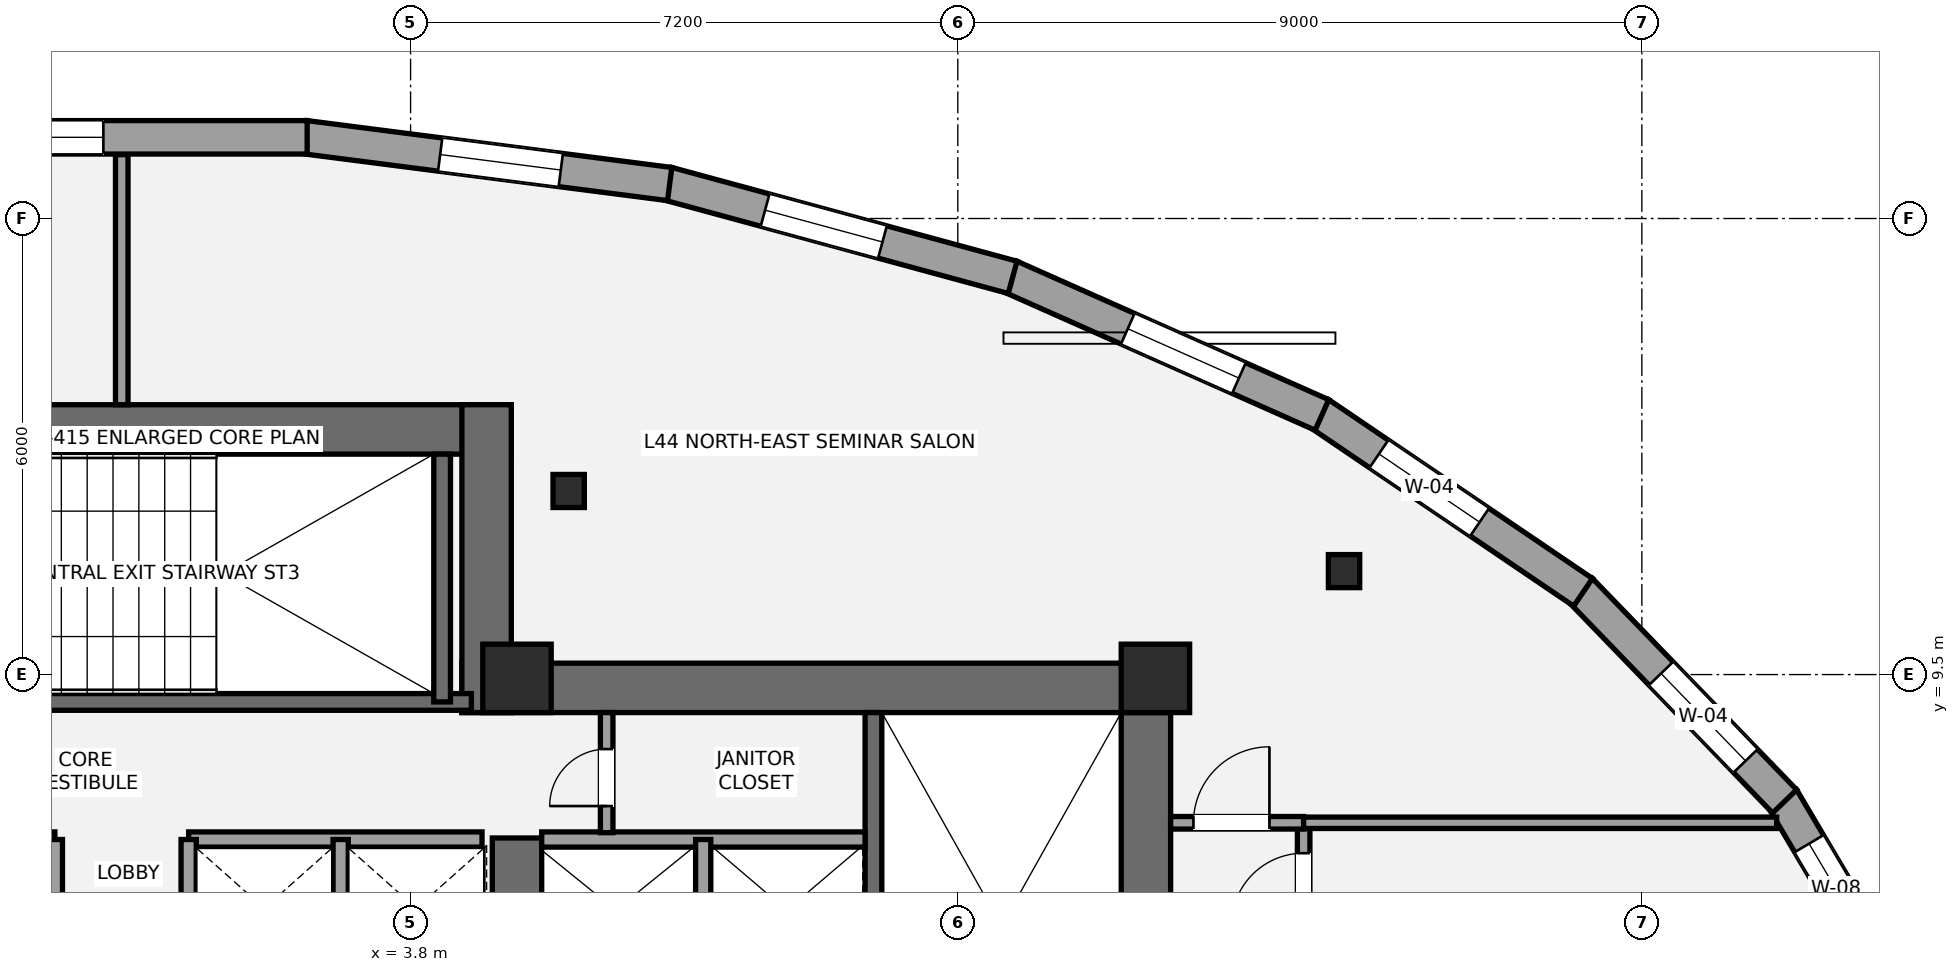
"""IFC4 building model, lengths in metres.
Left out: names, types, materials, properties, quantities, classifications, styles, units other than length and angle.
Written with IfcOpenShell. Run it as: python <this file> out.ifc"""

import sys

from ifc_helpers import new_model, si_unit, direction, frame, frame_2d, origin, origin_2d, place, context, subcontext, project, spatial, rectangle, i_section, extrude, element, fill, save


model = new_model("IFC4")
c1 = context("Model", 3, precision=1e-05, world=origin(), true_north=direction((0.0, 1.0)))
c2 = subcontext(c1, "Body", "Model", "MODEL_VIEW")
j1 = project(units=[si_unit("LENGTHUNIT", "METRE"), si_unit("PLANEANGLEUNIT", "RADIAN")], contexts=[c1])
p1 = place(None, origin())
s1 = spatial("IfcSite", under=j1, at=p1, CompositionType="ELEMENT")
p2 = place(p1, origin())
s2 = spatial("IfcBuilding", under=s1, at=p2, CompositionType="ELEMENT")
p3 = place(p2, frame((0.0, 0.0, 163.0)))
s3 = spatial("IfcBuildingStorey", under=s2, at=p3, CompositionType="ELEMENT", Elevation=163.0)
p4 = place(p3, frame((13.475, 1.2, 0.0), z_axis=(0.0, 0.0, 1.0), x_axis=(0.0, 1.0, 0.0)))
e1 = element("IfcWall", 1, at=p4, inside=s3, PredefinedType="SHEAR", context=c2, shape_type="SweptSolid", body=[
    extrude(rectangle(XDim=8.45, YDim=0.65, at=frame_2d((4.225, 0.0))), origin(), (0.0, 0.0, 1.0), 3.2),
])
p5 = place(p3, frame((4.475, 9.325, 0.0), z_axis=(0.0, 0.0, 1.0), x_axis=(1.0, 0.0, 0.0)))
e2 = element("IfcWall", 2, at=p5, inside=s3, PredefinedType="SHEAR", context=c2, shape_type="SweptSolid", body=[
    extrude(rectangle(XDim=9.325, YDim=0.65, at=frame_2d((4.663, 0.0))), origin(), (0.0, 0.0, 1.0), 3.2),
])
p6 = place(p3, frame((5.2, 5.35, 0.0), z_axis=(0.0, 0.0, 1.0), x_axis=(0.0, 1.0, 0.0)))
e3 = element("IfcWall", 3, at=p6, inside=s3, PredefinedType="SHEAR", context=c2, shape_type="SweptSolid", body=[
    extrude(rectangle(XDim=2.0, YDim=0.65, at=frame_2d((1.0, 0.0))), origin(), (0.0, 0.0, 1.0), 3.2),
])
p7 = place(p3, frame((9.89, 1.85, 0.0), z_axis=(0.0, 0.0, 1.0), x_axis=(0.0, 1.0, 0.0)))
e4 = element("IfcWall", 4, at=p7, inside=s3, PredefinedType="SHEAR", context=c2, shape_type="SweptSolid", body=[
    extrude(rectangle(XDim=7.15, YDim=0.22, at=frame_2d((3.575, 0.0))), origin(), (0.0, 0.0, 1.0), 3.2),
])
p8 = place(p3, frame((-5.125, 12.725, 0.0), z_axis=(0.0, 0.0, 1.0), x_axis=(1.0, 0.0, 0.0)))
e5 = element("IfcWall", 5, at=p8, inside=s3, PredefinedType="SHEAR", context=c2, shape_type="SweptSolid", body=[
    extrude(rectangle(XDim=10.25, YDim=0.65, at=frame_2d((5.125, 0.0))), origin(), (0.0, 0.0, 1.0), 3.2),
])
p9 = place(p3, frame((4.8, 9.0, 0.0), z_axis=(0.0, 0.0, 1.0), x_axis=(0.0, 1.0, 0.0)))
e6 = element("IfcWall", 6, at=p9, inside=s3, PredefinedType="SHEAR", context=c2, shape_type="SweptSolid", body=[
    extrude(rectangle(XDim=4.05, YDim=0.65, at=frame_2d((2.025, 0.0))), origin(), (0.0, 0.0, 1.0), 3.2),
])
p10 = place(p3, frame((-4.7, 9.14, 0.0), z_axis=(0.0, 0.0, 1.0), x_axis=(1.0, 0.0, 0.0)))
e7 = element("IfcWall", 7, at=p10, inside=s3, PredefinedType="SHEAR", context=c2, shape_type="SweptSolid", body=[
    extrude(rectangle(XDim=9.3, YDim=0.22, at=frame_2d((4.65, 0.0))), origin(), (0.0, 0.0, 1.0), 3.2),
])
p11 = place(p10, frame((1.15, 0.0, 0.0)))
e8 = element("IfcOpeningElement", 8, at=p11, cuts=e7, PredefinedType="OPENING", context=c2, shape_type="SweptSolid", body=[
    extrude(rectangle(XDim=1.05, YDim=2.15, at=frame_2d((0.525, 1.075))), frame((0.0, 0.12, 0.0), z_axis=(0.0, -1.0, 0.0), x_axis=(1.0, 0.0, 0.0)), (0.0, 0.0, 1.0), 0.24),
])
p12 = place(p3, frame((4.215, 9.14, 0.0), z_axis=(0.0, 0.0, 1.0), x_axis=(0.0, 1.0, 0.0)))
e9 = element("IfcWall", 9, at=p12, inside=s3, PredefinedType="SHEAR", context=c2, shape_type="SweptSolid", body=[
    extrude(rectangle(XDim=3.26, YDim=0.22, at=frame_2d((1.63, 0.0))), origin(), (0.0, 0.0, 1.0), 3.2),
])
for number, where, z_axis, x_axis in (
    (10, (5.2, 9.45, 0.0), (0.0, 0.0, 1.0), (1.0, 0.0, 0.0)),
    (11, (13.6, 9.45, 0.0), (0.0, 0.0, 1.0), (1.0, 0.0, 0.0)),
):
    element("IfcColumn", number, at=place(p3, frame(where, z_axis=z_axis, x_axis=x_axis)), inside=s3, PredefinedType="COLUMN", context=c2, shape_type="SweptSolid", body=[
        extrude(rectangle(XDim=0.9, YDim=0.9, at=origin_2d()), origin(), (0.0, 0.0, 1.0), 3.2),
    ])
for number, where, z_axis, x_axis in (
    (12, (16.082, 10.861, 0.0), (0.0, 0.0, 1.0), (1.0, 0.0, 0.0)),
    (13, (5.88, 11.915, 0.0), (0.0, 0.0, 1.0), (1.0, 0.0, 0.0)),
):
    element("IfcColumn", number, at=place(p3, frame(where, z_axis=z_axis, x_axis=x_axis)), inside=s3, PredefinedType="COLUMN", context=c2, shape_type="SweptSolid", body=[
        extrude(i_section(OverallWidth=0.412, OverallDepth=0.435, WebThickness=0.036, FlangeThickness=0.057, at=origin_2d()), origin(), (0.0, 0.0, 1.0), 3.2),
    ])
p13 = place(p3, frame((21.847, 7.873, 0.0), z_axis=(0.0, 0.0, 1.0), x_axis=(0.508883387051, -0.860835465338, 0.0)))
e14 = element("IfcWall", 14, at=p13, inside=s3, PredefinedType="STANDARD", context=c2, shape_type="SweptSolid", body=[
    extrude(rectangle(XDim=3.577, YDim=0.44, at=frame_2d((1.788, 0.0))), origin(), (0.0, 0.0, 1.0), 2.315),
])
p14 = place(p13, frame((0.694, 0.0, 0.58)))
e15 = element("IfcOpeningElement", 15, at=p14, cuts=e14, PredefinedType="OPENING", context=c2, shape_type="SweptSolid", body=[
    extrude(rectangle(XDim=1.4, YDim=1.55, at=frame_2d((0.7, 0.775))), frame((0.0, 0.23, 0.0), z_axis=(0.0, -1.0, 0.0), x_axis=(1.0, 0.0, 0.0)), (0.0, 0.0, 1.0), 0.46),
])
p15 = place(p3, frame((19.192, 10.612, 0.0), z_axis=(0.0, 0.0, 1.0), x_axis=(0.694975307772, -0.719033602544, 0.0)))
e16 = element("IfcWall", 16, at=p15, inside=s3, PredefinedType="STANDARD", context=c2, shape_type="SweptSolid", body=[
    extrude(rectangle(XDim=3.866, YDim=0.44, at=frame_2d((1.933, 0.0))), origin(), (0.0, 0.0, 1.0), 2.315),
])
p16 = place(p15, frame((1.526, 0.0, 0.58)))
e17 = element("IfcOpeningElement", 17, at=p16, cuts=e16, PredefinedType="OPENING", context=c2, shape_type="SweptSolid", body=[
    extrude(rectangle(XDim=1.6, YDim=1.55, at=frame_2d((0.8, 0.775))), frame((0.0, 0.23, 0.0), z_axis=(0.0, -1.0, 0.0), x_axis=(1.0, 0.0, 0.0)), (0.0, 0.0, 1.0), 0.46),
])
p17 = place(p3, frame((15.757, 12.935, 0.0), z_axis=(0.0, 0.0, 1.0), x_axis=(0.827760762475, -0.561081206338, 0.0)))
e18 = element("IfcWall", 18, at=p17, inside=s3, PredefinedType="STANDARD", context=c2, shape_type="SweptSolid", body=[
    extrude(rectangle(XDim=4.192, YDim=0.44, at=frame_2d((2.096, 0.0))), origin(), (0.0, 0.0, 1.0), 2.315),
])
p18 = place(p17, frame((0.947, 0.0, 0.58)))
e19 = element("IfcOpeningElement", 19, at=p18, cuts=e18, PredefinedType="OPENING", context=c2, shape_type="SweptSolid", body=[
    extrude(rectangle(XDim=1.6, YDim=1.55, at=frame_2d((0.8, 0.775))), frame((0.0, 0.23, 0.0), z_axis=(0.0, -1.0, 0.0), x_axis=(1.0, 0.0, 0.0)), (0.0, 0.0, 1.0), 0.46),
])
p19 = place(p3, frame((11.69, 14.737, 0.0), z_axis=(0.0, 0.0, 1.0), x_axis=(0.913907994914, -0.405921392431, 0.0)))
e20 = element("IfcWall", 20, at=p19, inside=s3, PredefinedType="STANDARD", context=c2, shape_type="SweptSolid", body=[
    extrude(rectangle(XDim=4.487, YDim=0.44, at=frame_2d((2.244, 0.0))), origin(), (0.0, 0.0, 1.0), 2.315),
])
p20 = place(p19, frame((1.692, 0.0, 0.58)))
e21 = element("IfcOpeningElement", 21, at=p20, cuts=e20, PredefinedType="OPENING", context=c2, shape_type="SweptSolid", body=[
    extrude(rectangle(XDim=1.6, YDim=1.55, at=frame_2d((0.8, 0.775))), frame((0.0, 0.23, 0.0), z_axis=(0.0, -1.0, 0.0), x_axis=(1.0, 0.0, 0.0)), (0.0, 0.0, 1.0), 0.46),
])
p21 = place(p3, frame((7.179, 15.959, 0.0), z_axis=(0.0, 0.0, 1.0), x_axis=(0.965037424263, -0.262112132058, 0.0)))
e22 = element("IfcWall", 22, at=p21, inside=s3, PredefinedType="STANDARD", context=c2, shape_type="SweptSolid", body=[
    extrude(rectangle(XDim=4.707, YDim=0.44, at=frame_2d((2.353, 0.0))), origin(), (0.0, 0.0, 1.0), 2.315),
])
p22 = place(p21, frame((1.332, 0.0, 0.58)))
e23 = element("IfcOpeningElement", 23, at=p22, cuts=e22, PredefinedType="OPENING", context=c2, shape_type="SweptSolid", body=[
    extrude(rectangle(XDim=1.6, YDim=1.55, at=frame_2d((0.8, 0.775))), frame((0.0, 0.23, 0.0), z_axis=(0.0, -1.0, 0.0), x_axis=(1.0, 0.0, 0.0)), (0.0, 0.0, 1.0), 0.46),
])
p23 = place(p3, frame((2.411, 16.57, 0.0), z_axis=(0.0, 0.0, 1.0), x_axis=(0.991852910824, -0.127388395426, 0.0)))
e24 = element("IfcWall", 24, at=p23, inside=s3, PredefinedType="STANDARD", context=c2, shape_type="SweptSolid", body=[
    extrude(rectangle(XDim=4.837, YDim=0.44, at=frame_2d((2.418, 0.0))), origin(), (0.0, 0.0, 1.0), 2.315),
])
p24 = place(p23, frame((1.793, 0.0, 0.58)))
e25 = element("IfcOpeningElement", 25, at=p24, cuts=e24, PredefinedType="OPENING", context=c2, shape_type="SweptSolid", body=[
    extrude(rectangle(XDim=1.6, YDim=1.55, at=frame_2d((0.8, 0.775))), frame((0.0, 0.23, 0.0), z_axis=(0.0, -1.0, 0.0), x_axis=(1.0, 0.0, 0.0)), (0.0, 0.0, 1.0), 0.46),
])
p25 = place(p3, frame((-2.439, 16.568, 0.0), z_axis=(0.0, 0.0, 1.0), x_axis=(1.0, 0.0, 0.0)))
e26 = element("IfcWall", 26, at=p25, inside=s3, PredefinedType="STANDARD", context=c2, shape_type="SweptSolid", body=[
    extrude(rectangle(XDim=4.878, YDim=0.44, at=frame_2d((2.439, 0.0))), origin(), (0.0, 0.0, 1.0), 2.315),
])
p26 = place(p25, frame((0.597, 0.0, 0.58)))
e27 = element("IfcOpeningElement", 27, at=p26, cuts=e26, PredefinedType="OPENING", context=c2, shape_type="SweptSolid", body=[
    extrude(rectangle(XDim=1.6, YDim=1.55, at=frame_2d((0.8, 0.775))), frame((0.0, 0.23, 0.0), z_axis=(0.0, -1.0, 0.0), x_axis=(1.0, 0.0, 0.0)), (0.0, 0.0, 1.0), 0.46),
])
p27 = place(p3, frame((5.525, 7.33, 0.0), z_axis=(0.0, 0.0, 1.0), x_axis=(1.0, 0.0, 0.0)))
e28 = element("IfcWall", 28, at=p27, inside=s3, PredefinedType="SOLIDWALL", context=c2, shape_type="SweptSolid", body=[
    extrude(rectangle(XDim=4.255, YDim=0.2, at=frame_2d((2.127, 0.0))), origin(), (0.0, 0.0, 1.0), 3.02),
])
p28 = place(p3, frame((7.65, 5.47, 0.0), z_axis=(0.0, 0.0, 1.0), x_axis=(0.0, 1.0, 0.0)))
e29 = element("IfcWall", 29, at=p28, inside=s3, PredefinedType="SOLIDWALL", context=c2, shape_type="SweptSolid", body=[
    extrude(rectangle(XDim=1.86, YDim=0.2, at=frame_2d((0.93, 0.0))), origin(), (0.0, 0.0, 1.0), 3.02),
])
for number, where, z_axis, x_axis in (
    (30, (-4.74, 7.33, 0.0), (0.0, 0.0, 1.0), (1.0, 0.0, 0.0)),
    (31, (0.88, 7.33, 0.0), (0.0, 0.0, 1.0), (1.0, 0.0, 0.0)),
):
    element("IfcWall", number, at=place(p3, frame(where, z_axis=z_axis, x_axis=x_axis)), inside=s3, PredefinedType="SOLIDWALL", context=c2, shape_type="SweptSolid", body=[
        extrude(rectangle(XDim=3.86, YDim=0.2, at=frame_2d((1.93, 0.0))), origin(), (0.0, 0.0, 1.0), 3.02),
    ])
for number, where, z_axis, x_axis in (
    (32, (2.88, 5.52, 0.0), (0.0, 0.0, 1.0), (0.0, 1.0, 0.0)),
    (33, (-0.88, 5.52, 0.0), (0.0, 0.0, 1.0), (0.0, 1.0, 0.0)),
    (34, (0.88, 5.52, 0.0), (0.0, 0.0, 1.0), (0.0, 1.0, 0.0)),
):
    element("IfcWall", number, at=place(p3, frame(where, z_axis=z_axis, x_axis=x_axis)), inside=s3, PredefinedType="SOLIDWALL", context=c2, shape_type="SweptSolid", body=[
        extrude(rectangle(XDim=1.81, YDim=0.2, at=frame_2d((0.905, 0.0))), origin(), (0.0, 0.0, 1.0), 3.02),
    ])
p29 = place(p3, frame((6.38, 7.42, 0.0), z_axis=(0.0, 0.0, 1.0), x_axis=(0.0, 1.0, 0.0)))
e35 = element("IfcWall", 35, at=p29, inside=s3, PredefinedType="PARTITIONING", context=c2, shape_type="SweptSolid", body=[
    extrude(rectangle(XDim=1.58, YDim=0.165, at=frame_2d((0.79, 0.0))), origin(), (0.0, 0.0, 1.0), 3.02),
])
p30 = place(p29, frame((0.35, 0.0, 0.0)))
e36 = element("IfcOpeningElement", 36, at=p30, cuts=e35, PredefinedType="OPENING", context=c2, shape_type="SweptSolid", body=[
    extrude(rectangle(XDim=0.75, YDim=2.1, at=frame_2d((0.375, 1.05))), frame((0.0, 0.093, 0.0), z_axis=(0.0, -1.0, 0.0), x_axis=(1.0, 0.0, 0.0)), (0.0, 0.0, 1.0), 0.185),
])
p31 = place(p3, frame((15.55, -12.773, 0.0), z_axis=(0.0, 0.0, 1.0), x_axis=(0.0, 1.0, 0.0)))
e37 = element("IfcWall", 37, at=p31, inside=s3, PredefinedType="PARTITIONING", context=c2, shape_type="SweptSolid", body=[
    extrude(rectangle(XDim=20.323, YDim=0.165, at=frame_2d((10.162, 0.0))), origin(), (0.0, 0.0, 1.0), 2.473),
])
p32 = place(p31, frame((5.773, 0.0, 0.0)))
e38 = element("IfcOpeningElement", 38, at=p32, cuts=e37, PredefinedType="OPENING", context=c2, shape_type="SweptSolid", body=[
    extrude(rectangle(XDim=0.85, YDim=2.1, at=frame_2d((0.425, 1.05))), frame((0.0, 0.093, 0.0), z_axis=(0.0, -1.0, 0.0), x_axis=(1.0, 0.0, 0.0)), (0.0, 0.0, 1.0), 0.185),
])
p33 = place(p31, frame((9.823, 0.0, 0.0)))
e39 = element("IfcOpeningElement", 39, at=p33, cuts=e37, PredefinedType="OPENING", context=c2, shape_type="SweptSolid", body=[
    extrude(rectangle(XDim=0.95, YDim=2.15, at=frame_2d((0.475, 1.075))), frame((0.0, 0.093, 0.0), z_axis=(0.0, -1.0, 0.0), x_axis=(1.0, 0.0, 0.0)), (0.0, 0.0, 1.0), 0.185),
])
p34 = place(p31, frame((14.223, 0.0, 0.0)))
e40 = element("IfcOpeningElement", 40, at=p34, cuts=e37, PredefinedType="OPENING", context=c2, shape_type="SweptSolid", body=[
    extrude(rectangle(XDim=0.95, YDim=2.15, at=frame_2d((0.475, 1.075))), frame((0.0, 0.093, 0.0), z_axis=(0.0, -1.0, 0.0), x_axis=(1.0, 0.0, 0.0)), (0.0, 0.0, 1.0), 0.185),
])
p35 = place(p31, frame((18.973, 0.0, 0.0)))
e41 = element("IfcOpeningElement", 41, at=p35, cuts=e37, PredefinedType="OPENING", context=c2, shape_type="SweptSolid", body=[
    extrude(rectangle(XDim=0.95, YDim=2.15, at=frame_2d((0.475, 1.075))), frame((0.0, 0.093, 0.0), z_axis=(0.0, -1.0, 0.0), x_axis=(1.0, 0.0, 0.0)), (0.0, 0.0, 1.0), 0.185),
])
p36 = place(p3, frame((13.8, 7.55, 0.0), z_axis=(0.0, 0.0, 1.0), x_axis=(1.0, 0.0, 0.0)))
e42 = element("IfcWall", 42, at=p36, inside=s3, PredefinedType="PARTITIONING", context=c2, shape_type="SweptSolid", body=[
    extrude(rectangle(XDim=1.75, YDim=0.165, at=frame_2d((0.875, 0.0))), origin(), (0.0, 0.0, 1.0), 2.473),
])
p37 = place(p36, frame((0.3, 0.0, 0.0)))
e43 = element("IfcOpeningElement", 43, at=p37, cuts=e42, PredefinedType="OPENING", context=c2, shape_type="SweptSolid", body=[
    extrude(rectangle(XDim=1.0, YDim=2.15, at=frame_2d((0.5, 1.075))), frame((0.0, 0.093, 0.0), z_axis=(0.0, -1.0, 0.0), x_axis=(1.0, 0.0, 0.0)), (0.0, 0.0, 1.0), 0.185),
])
p38 = place(p3, frame((15.55, 7.55, 0.0), z_axis=(0.0, 0.0, 1.0), x_axis=(1.0, 0.0, 0.0)))
e44 = element("IfcWall", 44, at=p38, inside=s3, PredefinedType="PLUMBINGWALL", context=c2, shape_type="SweptSolid", body=[
    extrude(rectangle(XDim=6.223, YDim=0.15, at=frame_2d((3.112, 0.0))), origin(), (0.0, 0.0, 1.0), 2.473),
])
p39 = place(p3, frame((0.0, 13.05, 0.0), z_axis=(0.0, 0.0, 1.0), x_axis=(0.0, 1.0, 0.0)))
e45 = element("IfcWall", 45, at=p39, inside=s3, PredefinedType="PARTITIONING", context=c2, shape_type="SweptSolid", body=[
    extrude(rectangle(XDim=3.29, YDim=0.165, at=frame_2d((1.645, 0.0))), origin(), (0.0, 0.0, 1.0), 3.02),
])
p40 = place(p14, origin())
e46 = element("IfcWindow", 46, at=p40, inside=s3, PartitioningType="SINGLE_PANEL", PredefinedType="WINDOW", context=c2, shape_type="SweptSolid", body=[
    extrude(rectangle(XDim=1.4, YDim=1.55, at=frame_2d((0.7, 0.775))), frame((0.0, -0.01, 0.0), z_axis=(0.0, -1.0, 0.0), x_axis=(1.0, 0.0, 0.0)), (0.0, 0.0, 1.0), 0.06),
])
fill(e15, e46)
p41 = place(p16, origin())
e47 = element("IfcWindow", 47, at=p41, inside=s3, PartitioningType="SINGLE_PANEL", PredefinedType="WINDOW", context=c2, shape_type="SweptSolid", body=[
    extrude(rectangle(XDim=1.6, YDim=1.55, at=frame_2d((0.8, 0.775))), frame((0.0, -0.01, 0.0), z_axis=(0.0, -1.0, 0.0), x_axis=(1.0, 0.0, 0.0)), (0.0, 0.0, 1.0), 0.06),
])
fill(e17, e47)
p42 = place(p18, origin())
e48 = element("IfcWindow", 48, at=p42, inside=s3, PartitioningType="SINGLE_PANEL", PredefinedType="WINDOW", context=c2, shape_type="SweptSolid", body=[
    extrude(rectangle(XDim=1.6, YDim=1.55, at=frame_2d((0.8, 0.775))), frame((0.0, -0.01, 0.0), z_axis=(0.0, -1.0, 0.0), x_axis=(1.0, 0.0, 0.0)), (0.0, 0.0, 1.0), 0.06),
])
fill(e19, e48)
p43 = place(p20, origin())
e49 = element("IfcWindow", 49, at=p43, inside=s3, PartitioningType="SINGLE_PANEL", PredefinedType="WINDOW", context=c2, shape_type="SweptSolid", body=[
    extrude(rectangle(XDim=1.6, YDim=1.55, at=frame_2d((0.8, 0.775))), frame((0.0, -0.01, 0.0), z_axis=(0.0, -1.0, 0.0), x_axis=(1.0, 0.0, 0.0)), (0.0, 0.0, 1.0), 0.06),
])
fill(e21, e49)
p44 = place(p22, origin())
e50 = element("IfcWindow", 50, at=p44, inside=s3, PartitioningType="SINGLE_PANEL", PredefinedType="WINDOW", context=c2, shape_type="SweptSolid", body=[
    extrude(rectangle(XDim=1.6, YDim=1.55, at=frame_2d((0.8, 0.775))), frame((0.0, -0.01, 0.0), z_axis=(0.0, -1.0, 0.0), x_axis=(1.0, 0.0, 0.0)), (0.0, 0.0, 1.0), 0.06),
])
fill(e23, e50)
p45 = place(p24, origin())
e51 = element("IfcWindow", 51, at=p45, inside=s3, PartitioningType="SINGLE_PANEL", PredefinedType="WINDOW", context=c2, shape_type="SweptSolid", body=[
    extrude(rectangle(XDim=1.6, YDim=1.55, at=frame_2d((0.8, 0.775))), frame((0.0, -0.01, 0.0), z_axis=(0.0, -1.0, 0.0), x_axis=(1.0, 0.0, 0.0)), (0.0, 0.0, 1.0), 0.06),
])
fill(e25, e51)
p46 = place(p26, origin())
e52 = element("IfcWindow", 52, at=p46, inside=s3, PartitioningType="SINGLE_PANEL", PredefinedType="WINDOW", context=c2, shape_type="SweptSolid", body=[
    extrude(rectangle(XDim=1.6, YDim=1.55, at=frame_2d((0.8, 0.775))), frame((0.0, -0.01, 0.0), z_axis=(0.0, -1.0, 0.0), x_axis=(1.0, 0.0, 0.0)), (0.0, 0.0, 1.0), 0.06),
])
fill(e27, e52)
p47 = place(p30, origin())
e53 = element("IfcDoor", 53, at=p47, inside=s3, OperationType="SINGLE_SWING_LEFT", PredefinedType="DOOR", context=c2, shape_type="SweptSolid", body=[
    extrude(rectangle(XDim=0.75, YDim=2.1, at=frame_2d((0.375, 1.05))), frame((0.0, 0.025, 0.0), z_axis=(0.0, -1.0, 0.0), x_axis=(1.0, 0.0, 0.0)), (0.0, 0.0, 1.0), 0.05),
])
fill(e36, e53)
p48 = place(p37, origin())
e54 = element("IfcDoor", 54, at=p48, inside=s3, OperationType="SINGLE_SWING_RIGHT", PredefinedType="DOOR", context=c2, shape_type="SweptSolid", body=[
    extrude(rectangle(XDim=1.0, YDim=2.15, at=frame_2d((0.5, 1.075))), frame((0.0, 0.025, 0.0), z_axis=(0.0, -1.0, 0.0), x_axis=(1.0, 0.0, 0.0)), (0.0, 0.0, 1.0), 0.05),
])
fill(e43, e54)
p49 = place(p35, origin())
e55 = element("IfcDoor", 55, at=p49, inside=s3, OperationType="SINGLE_SWING_LEFT", PredefinedType="DOOR", context=c2, shape_type="SweptSolid", body=[
    extrude(rectangle(XDim=0.95, YDim=2.15, at=frame_2d((0.475, 1.075))), frame((0.0, 0.025, 0.0), z_axis=(0.0, -1.0, 0.0), x_axis=(1.0, 0.0, 0.0)), (0.0, 0.0, 1.0), 0.05),
])
fill(e41, e55)
save(model, sys.argv[1])
